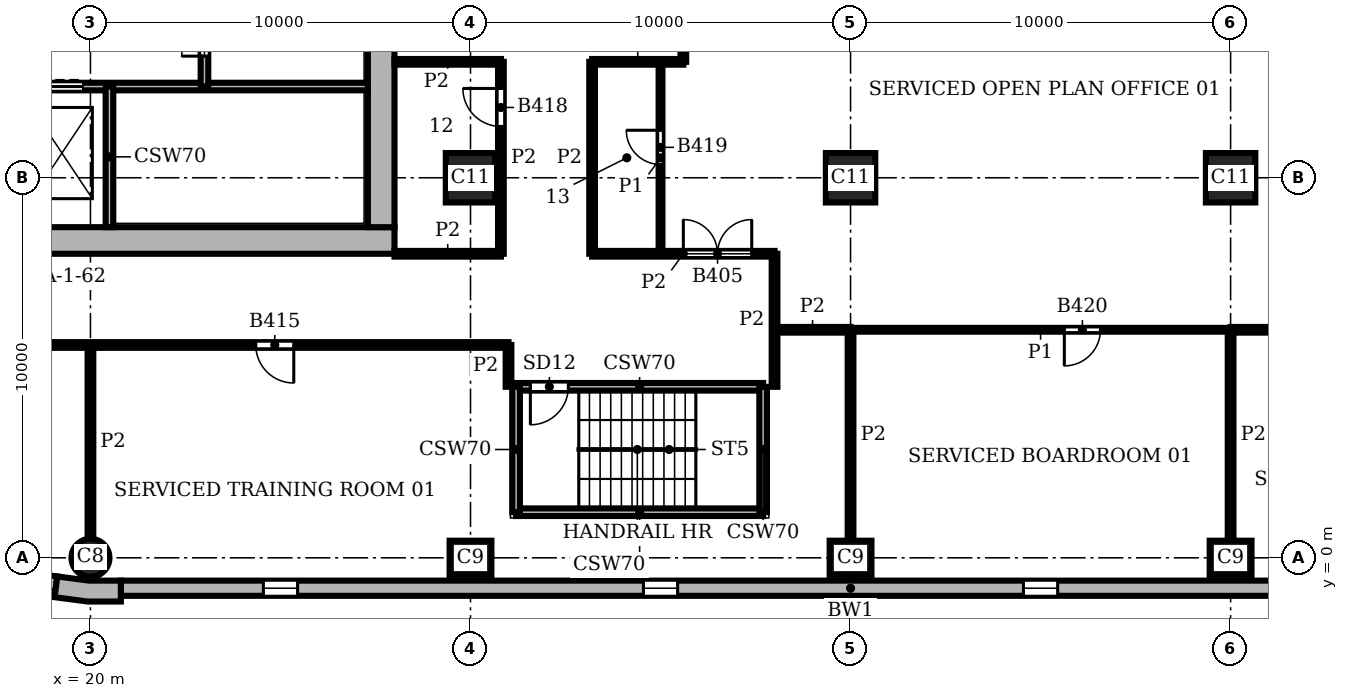
"""IFC4 building model, lengths in metres.
Left out: names, types, materials, properties, quantities, classifications, styles, units other than length and angle.
Written with IfcOpenShell. Run it as: python <this file> out.ifc"""

import sys

from ifc_helpers import new_model, si_unit, direction, frame, frame_2d, origin, origin_2d, place, context, subcontext, project, spatial, polyline, rectangle, circle, outline, extrude, element, fill, save


model = new_model("IFC4")
c1 = context("Model", 3, precision=1e-05, world=origin(), true_north=direction((0.0, 1.0)))
c2 = subcontext(c1, "Body", "Model", "MODEL_VIEW")
j1 = project(units=[si_unit("LENGTHUNIT", "METRE"), si_unit("PLANEANGLEUNIT", "RADIAN")], contexts=[c1])
p1 = place(None, origin())
s1 = spatial("IfcSite", under=j1, at=p1, CompositionType="ELEMENT")
p2 = place(p1, origin())
s2 = spatial("IfcBuilding", under=s1, at=p2, CompositionType="ELEMENT")
p3 = place(p2, frame((0.0, 0.0, 170.7)))
s3 = spatial("IfcBuildingStorey", under=s2, at=p3, CompositionType="ELEMENT", Elevation=170.7)
p4 = place(p3, frame((20.0, 0.0, 0.0), z_axis=(0.0, 0.0, 1.0), x_axis=(1.0, 0.0, 0.0)))
e1 = element("IfcColumn", 1, at=p4, inside=s3, PredefinedType="COLUMN", context=c2, shape_type="SweptSolid", body=[
    extrude(circle(Radius=0.5, at=origin_2d()), origin(), (0.0, 0.0, 1.0), 3.9),
])
for number, where, z_axis, x_axis in (
    (2, (30.0, 0.0, 0.0), (0.0, 0.0, 1.0), (1.0, 0.0, 0.0)),
    (3, (40.0, 0.0, 0.0), (0.0, 0.0, 1.0), (1.0, 0.0, 0.0)),
    (4, (50.0, 0.0, 0.0), (0.0, 0.0, 1.0), (1.0, 0.0, 0.0)),
):
    element("IfcColumn", number, at=place(p3, frame(where, z_axis=z_axis, x_axis=x_axis)), inside=s3, PredefinedType="COLUMN", context=c2, shape_type="SweptSolid", body=[
        extrude(rectangle(XDim=1.1, YDim=0.9, at=origin_2d()), origin(), (0.0, 0.0, 1.0), 3.9),
    ])
for number, where, z_axis, x_axis in (
    (5, (30.0, 10.0, 0.0), (0.0, 0.0, 1.0), (1.0, 0.0, 0.0)),
    (6, (40.0, 10.0, 0.0), (0.0, 0.0, 1.0), (1.0, 0.0, 0.0)),
    (7, (50.0, 10.0, 0.0), (0.0, 0.0, 1.0), (1.0, 0.0, 0.0)),
):
    element("IfcColumn", number, at=place(p3, frame(where, z_axis=z_axis, x_axis=x_axis)), inside=s3, PredefinedType="COLUMN", context=c2, shape_type="SweptSolid", body=[
        extrude(rectangle(XDim=1.3, YDim=1.3, at=origin_2d()), origin(), (0.0, 0.0, 1.0), 3.9),
    ])
p5 = place(p3, frame((8.0, 8.35, 0.0), z_axis=(0.0, 0.0, 1.0), x_axis=(1.0, 0.0, 0.0)))
e8 = element("IfcWall", 8, at=p5, inside=s3, PredefinedType="SHEAR", context=c2, shape_type="SweptSolid", body=[
    extrude(rectangle(XDim=20.0, YDim=0.7, at=frame_2d((10.0, 0.0))), origin(), (0.0, 0.0, 1.0), 3.9),
])
p6 = place(p3, frame((27.65, 8.7, 0.0), z_axis=(0.0, 0.0, 1.0), x_axis=(0.0, 1.0, 0.0)))
e9 = element("IfcWall", 9, at=p6, inside=s3, PredefinedType="SHEAR", context=c2, shape_type="SweptSolid", body=[
    extrude(rectangle(XDim=18.6, YDim=0.7, at=frame_2d((9.3, 0.0))), origin(), (0.0, 0.0, 1.0), 3.9),
])
p7 = place(p6, frame((4.75, 0.0, 0.0)))
e10 = element("IfcOpeningElement", 10, at=p7, cuts=e9, PredefinedType="OPENING", context=c2, shape_type="SweptSolid", body=[
    extrude(rectangle(XDim=1.6, YDim=2.1, at=frame_2d((0.8, 1.05))), frame((0.0, 0.36, 0.0), z_axis=(0.0, -1.0, 0.0), x_axis=(1.0, 0.0, 0.0)), (0.0, 0.0, 1.0), 0.72),
])
p8 = place(p3, origin())
e11 = element("IfcWall", 11, at=p8, inside=s3, PredefinedType="SOLIDWALL", context=c2, shape_type="SweptSolid", body=[
    extrude(outline(polyline([(19.076, -0.887), (19.057, -1.036), (19.925, -1.15), (20.8, -1.15), (20.8, -1.0), (20.8, -0.6), (19.961, -0.6), (19.128, -0.49), (19.076, -0.887)])), origin(), (0.0, 0.0, 1.0), 3.9),
])
p9 = place(p3, frame((20.8, -0.8, 0.0), z_axis=(0.0, 0.0, 1.0), x_axis=(1.0, 0.0, 0.0)))
e12 = element("IfcWall", 12, at=p9, inside=s3, PredefinedType="SOLIDWALL", context=c2, shape_type="SweptSolid", body=[
    extrude(rectangle(XDim=38.4, YDim=0.4, at=frame_2d((19.2, 0.0))), origin(), (0.0, 0.0, 1.0), 3.9),
])
p10 = place(p9, frame((3.75, 0.0, 0.9)))
e13 = element("IfcOpeningElement", 13, at=p10, cuts=e12, PredefinedType="OPENING", context=c2, shape_type="SweptSolid", body=[
    extrude(rectangle(XDim=0.9, YDim=2.35, at=frame_2d((0.45, 1.175))), frame((0.0, 0.21, 0.0), z_axis=(0.0, -1.0, 0.0), x_axis=(1.0, 0.0, 0.0)), (0.0, 0.0, 1.0), 0.42),
])
p11 = place(p9, frame((13.75, 0.0, 0.9)))
e14 = element("IfcOpeningElement", 14, at=p11, cuts=e12, PredefinedType="OPENING", context=c2, shape_type="SweptSolid", body=[
    extrude(rectangle(XDim=0.9, YDim=2.35, at=frame_2d((0.45, 1.175))), frame((0.0, 0.21, 0.0), z_axis=(0.0, -1.0, 0.0), x_axis=(1.0, 0.0, 0.0)), (0.0, 0.0, 1.0), 0.42),
])
p12 = place(p9, frame((23.75, 0.0, 0.9)))
e15 = element("IfcOpeningElement", 15, at=p12, cuts=e12, PredefinedType="OPENING", context=c2, shape_type="SweptSolid", body=[
    extrude(rectangle(XDim=0.9, YDim=2.35, at=frame_2d((0.45, 1.175))), frame((0.0, 0.21, 0.0), z_axis=(0.0, -1.0, 0.0), x_axis=(1.0, 0.0, 0.0)), (0.0, 0.0, 1.0), 0.42),
])
p13 = place(p9, frame((33.75, 0.0, 0.9)))
e16 = element("IfcOpeningElement", 16, at=p13, cuts=e12, PredefinedType="OPENING", context=c2, shape_type="SweptSolid", body=[
    extrude(rectangle(XDim=0.9, YDim=2.35, at=frame_2d((0.45, 1.175))), frame((0.0, 0.21, 0.0), z_axis=(0.0, -1.0, 0.0), x_axis=(1.0, 0.0, 0.0)), (0.0, 0.0, 1.0), 0.42),
])
p14 = place(p3, frame((15.017, -0.151, 0.0), z_axis=(0.0, 0.0, 1.0), x_axis=(0.991446429508, -0.130514280502, 0.0)))
e17 = element("IfcWall", 17, at=p14, inside=s3, PredefinedType="SOLIDWALL", context=c2, shape_type="SweptSolid", body=[
    extrude(rectangle(XDim=4.121, YDim=0.4, at=frame_2d((2.061, 0.0))), origin(), (0.0, 0.0, 1.0), 3.9),
])
p15 = place(p14, frame((1.611, 0.0, 0.9)))
e18 = element("IfcOpeningElement", 18, at=p15, cuts=e17, PredefinedType="OPENING", context=c2, shape_type="SweptSolid", body=[
    extrude(rectangle(XDim=0.9, YDim=2.35, at=frame_2d((0.45, 1.175))), frame((0.0, 0.21, 0.0), z_axis=(0.0, -1.0, 0.0), x_axis=(1.0, 0.0, 0.0)), (0.0, 0.0, 1.0), 0.42),
])
p16 = place(p3, frame((31.2, 1.2, 0.0), z_axis=(0.0, 0.0, 1.0), x_axis=(1.0, 0.0, 0.0)))
e19 = element("IfcWall", 19, at=p16, inside=s3, PredefinedType="SHEAR", context=c2, shape_type="SweptSolid", body=[
    extrude(rectangle(XDim=6.5, YDim=0.2, at=frame_2d((3.25, 0.0))), origin(), (0.0, 0.0, 1.0), 3.58),
])
p17 = place(p3, frame((31.2, 4.5, 0.0), z_axis=(0.0, 0.0, 1.0), x_axis=(1.0, 0.0, 0.0)))
e20 = element("IfcWall", 20, at=p17, inside=s3, PredefinedType="SHEAR", context=c2, shape_type="SweptSolid", body=[
    extrude(rectangle(XDim=6.5, YDim=0.2, at=frame_2d((3.25, 0.0))), origin(), (0.0, 0.0, 1.0), 3.58),
])
p18 = place(p17, frame((0.375, 0.0, 0.0)))
e21 = element("IfcOpeningElement", 21, at=p18, cuts=e20, PredefinedType="OPENING", context=c2, shape_type="SweptSolid", body=[
    extrude(rectangle(XDim=1.0, YDim=2.1, at=frame_2d((0.5, 1.05))), frame((0.0, 0.11, 0.0), z_axis=(0.0, -1.0, 0.0), x_axis=(1.0, 0.0, 0.0)), (0.0, 0.0, 1.0), 0.22),
])
p19 = place(p3, frame((13.8, 12.4, 0.0), z_axis=(0.0, 0.0, 1.0), x_axis=(1.0, 0.0, 0.0)))
e22 = element("IfcWall", 22, at=p19, inside=s3, PredefinedType="SHEAR", context=c2, shape_type="SweptSolid", body=[
    extrude(rectangle(XDim=13.5, YDim=0.2, at=frame_2d((6.75, 0.0))), origin(), (0.0, 0.0, 1.0), 3.58),
])
p20 = place(p19, frame((2.4, 0.0, 0.0)))
e23 = element("IfcOpeningElement", 23, at=p20, cuts=e22, PredefinedType="OPENING", context=c2, shape_type="SweptSolid", body=[
    extrude(rectangle(XDim=1.1, YDim=2.1, at=frame_2d((0.55, 1.05))), frame((0.0, 0.11, 0.0), z_axis=(0.0, -1.0, 0.0), x_axis=(1.0, 0.0, 0.0)), (0.0, 0.0, 1.0), 0.22),
])
p21 = place(p19, frame((4.9, 0.0, 0.0)))
e24 = element("IfcOpeningElement", 24, at=p21, cuts=e22, PredefinedType="OPENING", context=c2, shape_type="SweptSolid", body=[
    extrude(rectangle(XDim=1.1, YDim=2.1, at=frame_2d((0.55, 1.05))), frame((0.0, 0.11, 0.0), z_axis=(0.0, -1.0, 0.0), x_axis=(1.0, 0.0, 0.0)), (0.0, 0.0, 1.0), 0.22),
])
p22 = place(p19, frame((0.2, 0.0, 0.0)))
e25 = element("IfcOpeningElement", 25, at=p22, cuts=e22, PredefinedType="OPENING", context=c2, shape_type="SweptSolid", body=[
    extrude(rectangle(XDim=1.0, YDim=2.1, at=frame_2d((0.5, 1.05))), frame((0.0, 0.11, 0.0), z_axis=(0.0, -1.0, 0.0), x_axis=(1.0, 0.0, 0.0)), (0.0, 0.0, 1.0), 0.22),
])
p23 = place(p3, frame((20.5, 8.7, 0.0), z_axis=(0.0, 0.0, 1.0), x_axis=(0.0, 1.0, 0.0)))
e26 = element("IfcWall", 26, at=p23, inside=s3, PredefinedType="SHEAR", context=c2, shape_type="SweptSolid", body=[
    extrude(rectangle(XDim=3.7, YDim=0.2, at=frame_2d((1.85, 0.0))), origin(), (0.0, 0.0, 1.0), 3.58),
])
p24 = place(p3, frame((23.0, 12.4, 0.0), z_axis=(0.0, 0.0, 1.0), x_axis=(0.0, 1.0, 0.0)))
e27 = element("IfcWall", 27, at=p24, inside=s3, PredefinedType="SHEAR", context=c2, shape_type="SweptSolid", body=[
    extrude(rectangle(XDim=2.8, YDim=0.2, at=frame_2d((1.4, 0.0))), origin(), (0.0, 0.0, 1.0), 3.58),
])
p25 = place(p24, frame((0.8, 0.0, 0.0)))
e28 = element("IfcOpeningElement", 28, at=p25, cuts=e27, PredefinedType="OPENING", context=c2, shape_type="SweptSolid", body=[
    extrude(rectangle(XDim=1.2, YDim=2.1, at=frame_2d((0.6, 1.05))), frame((0.0, 0.11, 0.0), z_axis=(0.0, -1.0, 0.0), x_axis=(1.0, 0.0, 0.0)), (0.0, 0.0, 1.0), 0.22),
])
for number, where, z_axis, x_axis in (
    (29, (31.2, 1.2, 0.0), (0.0, 0.0, 1.0), (0.0, 1.0, 0.0)),
    (30, (37.7, 1.2, 0.0), (0.0, 0.0, 1.0), (0.0, 1.0, 0.0)),
):
    element("IfcWall", number, at=place(p3, frame(where, z_axis=z_axis, x_axis=x_axis)), inside=s3, PredefinedType="SHEAR", context=c2, shape_type="SweptSolid", body=[
        extrude(rectangle(XDim=3.3, YDim=0.2, at=frame_2d((1.65, 0.0))), origin(), (0.0, 0.0, 1.0), 3.58),
    ])
p26 = place(p3, frame((35.0, 8.0, 0.0), z_axis=(0.0, 0.0, 1.0), x_axis=(0.0, 1.0, 0.0)))
e31 = element("IfcWall", 31, at=p26, inside=s3, PredefinedType="PARTITIONING", context=c2, shape_type="SweptSolid", body=[
    extrude(rectangle(XDim=5.05, YDim=0.1, at=frame_2d((2.525, 0.0))), origin(), (0.0, 0.0, 1.0), 3.58),
])
p27 = place(p26, frame((2.35, 0.0, 0.0)))
e32 = element("IfcOpeningElement", 32, at=p27, cuts=e31, PredefinedType="OPENING", context=c2, shape_type="SweptSolid", body=[
    extrude(rectangle(XDim=0.9, YDim=2.1, at=frame_2d((0.45, 1.05))), frame((0.0, 0.06, 0.0), z_axis=(0.0, -1.0, 0.0), x_axis=(1.0, 0.0, 0.0)), (0.0, 0.0, 1.0), 0.12),
])
p28 = place(p3, frame((40.0, 6.0, 0.0), z_axis=(0.0, 0.0, 1.0), x_axis=(1.0, 0.0, 0.0)))
e33 = element("IfcWall", 33, at=p28, inside=s3, PredefinedType="PARTITIONING", context=c2, shape_type="SweptSolid", body=[
    extrude(rectangle(XDim=10.0, YDim=0.1, at=frame_2d((5.0, 0.0))), origin(), (0.0, 0.0, 1.0), 3.58),
])
p29 = place(p28, frame((5.625, 0.0, 0.0)))
e34 = element("IfcOpeningElement", 34, at=p29, cuts=e33, PredefinedType="OPENING", context=c2, shape_type="SweptSolid", body=[
    extrude(rectangle(XDim=0.95, YDim=2.1, at=frame_2d((0.475, 1.05))), frame((0.0, 0.06, 0.0), z_axis=(0.0, -1.0, 0.0), x_axis=(1.0, 0.0, 0.0)), (0.0, 0.0, 1.0), 0.12),
])
p30 = place(p3, frame((20.0, 0.5, 0.0), z_axis=(0.0, 0.0, 1.0), x_axis=(0.0, 1.0, 0.0)))
e35 = element("IfcWall", 35, at=p30, inside=s3, PredefinedType="PARTITIONING", context=c2, shape_type="SweptSolid", body=[
    extrude(rectangle(XDim=5.1, YDim=0.15, at=frame_2d((2.55, 0.0))), origin(), (0.0, 0.0, 1.0), 3.58),
])
p31 = place(p3, frame((30.8, 8.0, 0.0), z_axis=(0.0, 0.0, 1.0), x_axis=(0.0, 1.0, 0.0)))
e36 = element("IfcWall", 36, at=p31, inside=s3, PredefinedType="PARTITIONING", context=c2, shape_type="SweptSolid", body=[
    extrude(rectangle(XDim=5.05, YDim=0.15, at=frame_2d((2.525, 0.0))), origin(), (0.0, 0.0, 1.0), 3.58),
])
p32 = place(p31, frame((3.35, 0.0, 0.0)))
e37 = element("IfcOpeningElement", 37, at=p32, cuts=e36, PredefinedType="OPENING", context=c2, shape_type="SweptSolid", body=[
    extrude(rectangle(XDim=1.0, YDim=2.1, at=frame_2d((0.5, 1.05))), frame((0.0, 0.085, 0.0), z_axis=(0.0, -1.0, 0.0), x_axis=(1.0, 0.0, 0.0)), (0.0, 0.0, 1.0), 0.17),
])
p33 = place(p3, frame((31.0, 4.5, 0.0), z_axis=(0.0, 0.0, 1.0), x_axis=(0.0, 1.0, 0.0)))
e38 = element("IfcWall", 38, at=p33, inside=s3, PredefinedType="PARTITIONING", context=c2, shape_type="SweptSolid", body=[
    extrude(rectangle(XDim=1.1, YDim=0.15, at=frame_2d((0.55, 0.0))), origin(), (0.0, 0.0, 1.0), 3.58),
])
p34 = place(p3, frame((33.2, 8.0, 0.0), z_axis=(0.0, 0.0, 1.0), x_axis=(0.0, 1.0, 0.0)))
e39 = element("IfcWall", 39, at=p34, inside=s3, PredefinedType="PARTITIONING", context=c2, shape_type="SweptSolid", body=[
    extrude(rectangle(XDim=5.05, YDim=0.15, at=frame_2d((2.525, 0.0))), origin(), (0.0, 0.0, 1.0), 3.58),
])
p35 = place(p3, frame((35.6, 13.05, 0.0), z_axis=(0.0, 0.0, 1.0), x_axis=(0.0, 1.0, 0.0)))
e40 = element("IfcWall", 40, at=p35, inside=s3, PredefinedType="PARTITIONING", context=c2, shape_type="SweptSolid", body=[
    extrude(rectangle(XDim=2.4, YDim=0.15, at=frame_2d((1.2, 0.0))), origin(), (0.0, 0.0, 1.0), 3.58),
])
p36 = place(p3, frame((38.0, 4.5, 0.0), z_axis=(0.0, 0.0, 1.0), x_axis=(0.0, 1.0, 0.0)))
e41 = element("IfcWall", 41, at=p36, inside=s3, PredefinedType="PARTITIONING", context=c2, shape_type="SweptSolid", body=[
    extrude(rectangle(XDim=3.5, YDim=0.15, at=frame_2d((1.75, 0.0))), origin(), (0.0, 0.0, 1.0), 3.58),
])
for number, where, z_axis, x_axis in (
    (42, (40.0, 0.45, 0.0), (0.0, 0.0, 1.0), (0.0, 1.0, 0.0)),
    (43, (50.0, 0.45, 0.0), (0.0, 0.0, 1.0), (0.0, 1.0, 0.0)),
):
    element("IfcWall", number, at=place(p3, frame(where, z_axis=z_axis, x_axis=x_axis)), inside=s3, PredefinedType="PARTITIONING", context=c2, shape_type="SweptSolid", body=[
        extrude(rectangle(XDim=5.55, YDim=0.15, at=frame_2d((2.775, 0.0))), origin(), (0.0, 0.0, 1.0), 3.58),
    ])
p37 = place(p3, frame((5.6, 5.6, 0.0), z_axis=(0.0, 0.0, 1.0), x_axis=(1.0, 0.0, 0.0)))
e44 = element("IfcWall", 44, at=p37, inside=s3, PredefinedType="PARTITIONING", context=c2, shape_type="SweptSolid", body=[
    extrude(rectangle(XDim=25.4, YDim=0.15, at=frame_2d((12.7, 0.0))), origin(), (0.0, 0.0, 1.0), 3.58),
])
p38 = place(p37, frame((5.6, 0.0, 0.0)))
e45 = element("IfcOpeningElement", 45, at=p38, cuts=e44, PredefinedType="OPENING", context=c2, shape_type="SweptSolid", body=[
    extrude(rectangle(XDim=1.0, YDim=2.1, at=frame_2d((0.5, 1.05))), frame((0.0, 0.085, 0.0), z_axis=(0.0, -1.0, 0.0), x_axis=(1.0, 0.0, 0.0)), (0.0, 0.0, 1.0), 0.17),
])
p39 = place(p37, frame((11.0, 0.0, 0.0)))
e46 = element("IfcOpeningElement", 46, at=p39, cuts=e44, PredefinedType="OPENING", context=c2, shape_type="SweptSolid", body=[
    extrude(rectangle(XDim=1.0, YDim=2.1, at=frame_2d((0.5, 1.05))), frame((0.0, 0.085, 0.0), z_axis=(0.0, -1.0, 0.0), x_axis=(1.0, 0.0, 0.0)), (0.0, 0.0, 1.0), 0.17),
])
p40 = place(p37, frame((18.75, 0.0, 0.0)))
e47 = element("IfcOpeningElement", 47, at=p40, cuts=e44, PredefinedType="OPENING", context=c2, shape_type="SweptSolid", body=[
    extrude(rectangle(XDim=1.0, YDim=2.1, at=frame_2d((0.5, 1.05))), frame((0.0, 0.085, 0.0), z_axis=(0.0, -1.0, 0.0), x_axis=(1.0, 0.0, 0.0)), (0.0, 0.0, 1.0), 0.17),
])
p41 = place(p3, frame((38.0, 6.0, 0.0), z_axis=(0.0, 0.0, 1.0), x_axis=(1.0, 0.0, 0.0)))
e48 = element("IfcWall", 48, at=p41, inside=s3, PredefinedType="PARTITIONING", context=c2, shape_type="SweptSolid", body=[
    extrude(rectangle(XDim=2.0, YDim=0.15, at=frame_2d((1.0, 0.0))), origin(), (0.0, 0.0, 1.0), 3.58),
])
p42 = place(p3, frame((50.0, 6.0, 0.0), z_axis=(0.0, 0.0, 1.0), x_axis=(1.0, 0.0, 0.0)))
e49 = element("IfcWall", 49, at=p42, inside=s3, PredefinedType="PARTITIONING", context=c2, shape_type="SweptSolid", body=[
    extrude(rectangle(XDim=5.0, YDim=0.15, at=frame_2d((2.5, 0.0))), origin(), (0.0, 0.0, 1.0), 3.58),
])
p43 = place(p3, frame((28.0, 8.0, 0.0), z_axis=(0.0, 0.0, 1.0), x_axis=(1.0, 0.0, 0.0)))
e50 = element("IfcWall", 50, at=p43, inside=s3, PredefinedType="PARTITIONING", context=c2, shape_type="SweptSolid", body=[
    extrude(rectangle(XDim=2.8, YDim=0.15, at=frame_2d((1.4, 0.0))), origin(), (0.0, 0.0, 1.0), 3.58),
])
p44 = place(p3, frame((33.2, 8.0, 0.0), z_axis=(0.0, 0.0, 1.0), x_axis=(1.0, 0.0, 0.0)))
e51 = element("IfcWall", 51, at=p44, inside=s3, PredefinedType="PARTITIONING", context=c2, shape_type="SweptSolid", body=[
    extrude(rectangle(XDim=4.8, YDim=0.15, at=frame_2d((2.4, 0.0))), origin(), (0.0, 0.0, 1.0), 3.58),
])
p45 = place(p44, frame((2.4, 0.0, 0.0)))
e52 = element("IfcOpeningElement", 52, at=p45, cuts=e51, PredefinedType="OPENING", context=c2, shape_type="SweptSolid", body=[
    extrude(rectangle(XDim=1.8, YDim=2.1, at=frame_2d((0.9, 1.05))), frame((0.0, 0.085, 0.0), z_axis=(0.0, -1.0, 0.0), x_axis=(1.0, 0.0, 0.0)), (0.0, 0.0, 1.0), 0.17),
])
p46 = place(p3, frame((28.0, 13.05, 0.0), z_axis=(0.0, 0.0, 1.0), x_axis=(1.0, 0.0, 0.0)))
e53 = element("IfcWall", 53, at=p46, inside=s3, PredefinedType="PARTITIONING", context=c2, shape_type="SweptSolid", body=[
    extrude(rectangle(XDim=2.8, YDim=0.15, at=frame_2d((1.4, 0.0))), origin(), (0.0, 0.0, 1.0), 3.58),
])
p47 = place(p3, frame((33.2, 13.05, 0.0), z_axis=(0.0, 0.0, 1.0), x_axis=(1.0, 0.0, 0.0)))
e54 = element("IfcWall", 54, at=p47, inside=s3, PredefinedType="PARTITIONING", context=c2, shape_type="SweptSolid", body=[
    extrude(rectangle(XDim=2.4, YDim=0.15, at=frame_2d((1.2, 0.0))), origin(), (0.0, 0.0, 1.0), 3.58),
])
p48 = place(p10, origin())
e55 = element("IfcWindow", 55, at=p48, inside=s3, PartitioningType="SINGLE_PANEL", PredefinedType="WINDOW", context=c2, shape_type="SweptSolid", body=[
    extrude(rectangle(XDim=0.9, YDim=2.35, at=frame_2d((0.45, 1.175))), frame((0.0, 0.16, 0.0), z_axis=(0.0, -1.0, 0.0), x_axis=(1.0, 0.0, 0.0)), (0.0, 0.0, 1.0), 0.06),
])
fill(e13, e55)
p49 = place(p11, origin())
e56 = element("IfcWindow", 56, at=p49, inside=s3, PartitioningType="SINGLE_PANEL", PredefinedType="WINDOW", context=c2, shape_type="SweptSolid", body=[
    extrude(rectangle(XDim=0.9, YDim=2.35, at=frame_2d((0.45, 1.175))), frame((0.0, 0.16, 0.0), z_axis=(0.0, -1.0, 0.0), x_axis=(1.0, 0.0, 0.0)), (0.0, 0.0, 1.0), 0.06),
])
fill(e14, e56)
p50 = place(p12, origin())
e57 = element("IfcWindow", 57, at=p50, inside=s3, PartitioningType="SINGLE_PANEL", PredefinedType="WINDOW", context=c2, shape_type="SweptSolid", body=[
    extrude(rectangle(XDim=0.9, YDim=2.35, at=frame_2d((0.45, 1.175))), frame((0.0, 0.16, 0.0), z_axis=(0.0, -1.0, 0.0), x_axis=(1.0, 0.0, 0.0)), (0.0, 0.0, 1.0), 0.06),
])
fill(e15, e57)
p51 = place(p21, origin())
e58 = element("IfcDoor", 58, at=p51, inside=s3, OperationType="DOUBLE_DOOR_SLIDING", PredefinedType="DOOR", context=c2, shape_type="SweptSolid", body=[
    extrude(rectangle(XDim=1.1, YDim=2.1, at=frame_2d((0.55, 1.05))), frame((0.0, 0.025, 0.0), z_axis=(0.0, -1.0, 0.0), x_axis=(1.0, 0.0, 0.0)), (0.0, 0.0, 1.0), 0.05),
])
fill(e24, e58)
p52 = place(p18, frame((1.0, 0.0, 0.0), z_axis=(0.0, 0.0, 1.0), x_axis=(-1.0, 0.0, 0.0)))
e59 = element("IfcDoor", 59, at=p52, inside=s3, OperationType="SINGLE_SWING_RIGHT", PredefinedType="DOOR", context=c2, shape_type="SweptSolid", body=[
    extrude(rectangle(XDim=1.0, YDim=2.1, at=frame_2d((0.5, 1.05))), frame((0.0, 0.025, 0.0), z_axis=(0.0, -1.0, 0.0), x_axis=(1.0, 0.0, 0.0)), (0.0, 0.0, 1.0), 0.05),
])
fill(e21, e59)
p53 = place(p25, origin())
e60 = element("IfcDoor", 60, at=p53, inside=s3, OperationType="DOUBLE_DOOR_SINGLE_SWING", PredefinedType="DOOR", context=c2, shape_type="SweptSolid", body=[
    extrude(rectangle(XDim=1.2, YDim=2.1, at=frame_2d((0.6, 1.05))), frame((0.0, 0.025, 0.0), z_axis=(0.0, -1.0, 0.0), x_axis=(1.0, 0.0, 0.0)), (0.0, 0.0, 1.0), 0.05),
])
fill(e28, e60)
p54 = place(p45, origin())
e61 = element("IfcDoor", 61, at=p54, inside=s3, OperationType="DOUBLE_DOOR_SINGLE_SWING", PredefinedType="DOOR", context=c2, shape_type="SweptSolid", body=[
    extrude(rectangle(XDim=1.8, YDim=2.1, at=frame_2d((0.9, 1.05))), frame((0.0, 0.025, 0.0), z_axis=(0.0, -1.0, 0.0), x_axis=(1.0, 0.0, 0.0)), (0.0, 0.0, 1.0), 0.05),
])
fill(e52, e61)
p55 = place(p40, frame((1.0, 0.0, 0.0), z_axis=(0.0, 0.0, 1.0), x_axis=(-1.0, 0.0, 0.0)))
e62 = element("IfcDoor", 62, at=p55, inside=s3, OperationType="SINGLE_SWING_LEFT", PredefinedType="DOOR", context=c2, shape_type="SweptSolid", body=[
    extrude(rectangle(XDim=1.0, YDim=2.1, at=frame_2d((0.5, 1.05))), frame((0.0, 0.025, 0.0), z_axis=(0.0, -1.0, 0.0), x_axis=(1.0, 0.0, 0.0)), (0.0, 0.0, 1.0), 0.05),
])
fill(e47, e62)
p56 = place(p32, origin())
e63 = element("IfcDoor", 63, at=p56, inside=s3, OperationType="SINGLE_SWING_RIGHT", PredefinedType="DOOR", context=c2, shape_type="SweptSolid", body=[
    extrude(rectangle(XDim=1.0, YDim=2.1, at=frame_2d((0.5, 1.05))), frame((0.0, 0.025, 0.0), z_axis=(0.0, -1.0, 0.0), x_axis=(1.0, 0.0, 0.0)), (0.0, 0.0, 1.0), 0.05),
])
fill(e37, e63)
p57 = place(p27, origin())
e64 = element("IfcDoor", 64, at=p57, inside=s3, OperationType="SINGLE_SWING_RIGHT", PredefinedType="DOOR", context=c2, shape_type="SweptSolid", body=[
    extrude(rectangle(XDim=0.9, YDim=2.1, at=frame_2d((0.45, 1.05))), frame((0.0, 0.025, 0.0), z_axis=(0.0, -1.0, 0.0), x_axis=(1.0, 0.0, 0.0)), (0.0, 0.0, 1.0), 0.05),
])
fill(e32, e64)
p58 = place(p29, frame((0.95, 0.0, 0.0), z_axis=(0.0, 0.0, 1.0), x_axis=(-1.0, 0.0, 0.0)))
e65 = element("IfcDoor", 65, at=p58, inside=s3, OperationType="SINGLE_SWING_RIGHT", PredefinedType="DOOR", context=c2, shape_type="SweptSolid", body=[
    extrude(rectangle(XDim=0.95, YDim=2.1, at=frame_2d((0.475, 1.05))), frame((0.0, 0.025, 0.0), z_axis=(0.0, -1.0, 0.0), x_axis=(1.0, 0.0, 0.0)), (0.0, 0.0, 1.0), 0.05),
])
fill(e34, e65)
save(model, sys.argv[1])
